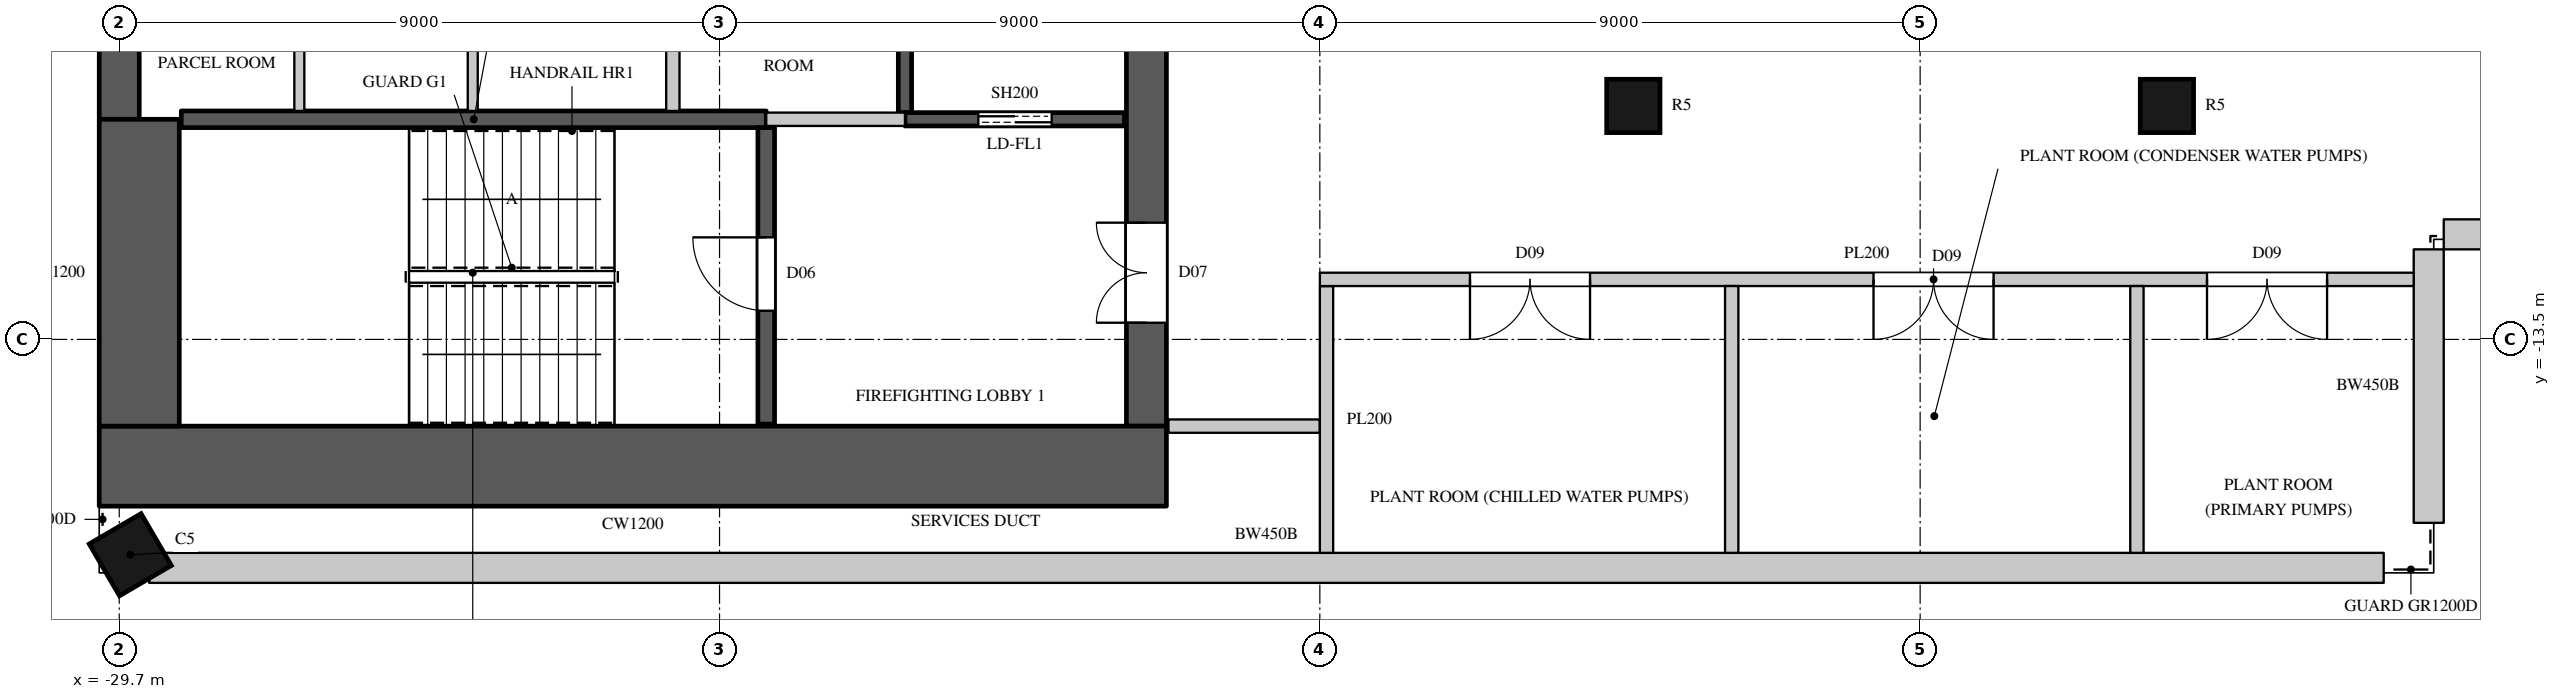
"""IFC4 building model, lengths in metres.
Left out: names, types, materials, properties, quantities, classifications, styles, units other than length and angle.
Written with IfcOpenShell. Run it as: python <this file> out.ifc"""

import sys

from ifc_helpers import new_model, si_unit, direction, frame, frame_2d, origin, origin_2d, place, context, subcontext, project, spatial, rectangle, circle, extrude, element, fill, save


model = new_model("IFC4")
c1 = context("Model", 3, precision=1e-05, world=origin(), true_north=direction((0.0, 1.0)))
c2 = subcontext(c1, "Body", "Model", "MODEL_VIEW")
j1 = project(units=[si_unit("LENGTHUNIT", "METRE"), si_unit("PLANEANGLEUNIT", "RADIAN")], contexts=[c1])
p1 = place(None, origin())
s1 = spatial("IfcSite", under=j1, at=p1, CompositionType="ELEMENT")
p2 = place(p1, origin())
s2 = spatial("IfcBuilding", under=s1, at=p2, CompositionType="ELEMENT")
p3 = place(p2, frame((0.0, 0.0, 335.0)))
s3 = spatial("IfcBuildingStorey", under=s2, at=p3, CompositionType="ELEMENT", Elevation=335.0)
p4 = place(p3, frame((-29.534, -16.728, 0.0), z_axis=(0.0, 0.0, 1.0), x_axis=(0.504399289829, -0.86347053014, 0.0)))
e1 = element("IfcColumn", 1, at=p4, inside=s3, PredefinedType="COLUMN", context=c2, shape_type="SweptSolid", body=[
    extrude(rectangle(XDim=0.9, YDim=0.9, at=origin_2d()), origin(), (0.0, 0.0, 1.0), 4.0),
])
for number, where, z_axis, x_axis in (
    (2, (-7.0, -10.0, 0.0), (0.0, 0.0, 1.0), (1.0, 0.0, 0.0)),
    (3, (1.0, -10.0, 0.0), (0.0, 0.0, 1.0), (1.0, 0.0, 0.0)),
):
    element("IfcColumn", number, at=place(p3, frame(where, z_axis=z_axis, x_axis=x_axis)), inside=s3, PredefinedType="COLUMN", context=c2, shape_type="SweptSolid", body=[
        extrude(circle(Radius=0.4, at=origin_2d()), origin(), (0.0, 0.0, 1.0), 4.0),
    ])
p5 = place(p3, frame((-29.25, -16.925, 0.0), z_axis=(0.0, 0.0, 1.0), x_axis=(1.0, 0.0, 0.0)))
e4 = element("IfcWall", 4, at=p5, inside=s3, PredefinedType="SOLIDWALL", context=c2, shape_type="SweptSolid", body=[
    extrude(rectangle(XDim=33.5, YDim=0.45, at=frame_2d((16.75, 0.0))), origin(), (0.0, 0.0, 1.0), 3.7),
])
for number, where, z_axis, x_axis in (
    (5, (4.925, -16.25, 0.0), (0.0, 0.0, 1.0), (0.0, 1.0, 0.0)),
    (6, (5.15, -11.925, 0.0), (0.0, 0.0, 1.0), (1.0, 0.0, 0.0)),
):
    element("IfcWall", number, at=place(p3, frame(where, z_axis=z_axis, x_axis=x_axis)), inside=s3, PredefinedType="SOLIDWALL", context=c2, shape_type="SweptSolid", body=[
        extrude(rectangle(XDim=4.1, YDim=0.45, at=frame_2d((2.05, 0.0))), origin(), (0.0, 0.0, 1.0), 3.7),
    ])
p6 = place(p3, frame((-30.0, -15.4, 0.0), z_axis=(0.0, 0.0, 1.0), x_axis=(1.0, 0.0, 0.0)))
e7 = element("IfcWall", 7, at=p6, inside=s3, PredefinedType="SHEAR", context=c2, shape_type="SweptSolid", body=[
    extrude(rectangle(XDim=16.0, YDim=1.2, at=frame_2d((8.0, 0.0))), origin(), (0.0, 0.0, 1.0), 4.0),
])
p7 = place(p3, frame((-14.3, -14.8, 0.0), z_axis=(0.0, 0.0, 1.0), x_axis=(0.0, 1.0, 0.0)))
e8 = element("IfcWall", 8, at=p7, inside=s3, PredefinedType="SHEAR", context=c2, shape_type="SweptSolid", body=[
    extrude(rectangle(XDim=29.6, YDim=0.6, at=frame_2d((14.8, 0.0))), origin(), (0.0, 0.0, 1.0), 4.0),
])
p8 = place(p7, frame((1.55, 0.0, 0.0)))
e9 = element("IfcOpeningElement", 9, at=p8, cuts=e8, PredefinedType="OPENING", context=c2, shape_type="SweptSolid", body=[
    extrude(rectangle(XDim=1.5, YDim=2.4, at=frame_2d((0.75, 1.2))), frame((0.0, 0.31, 0.0), z_axis=(0.0, -1.0, 0.0), x_axis=(1.0, 0.0, 0.0)), (0.0, 0.0, 1.0), 0.62),
])
p9 = place(p7, frame((26.55, 0.0, 0.0)))
e10 = element("IfcOpeningElement", 10, at=p9, cuts=e8, PredefinedType="OPENING", context=c2, shape_type="SweptSolid", body=[
    extrude(rectangle(XDim=1.5, YDim=2.4, at=frame_2d((0.75, 1.2))), frame((0.0, 0.31, 0.0), z_axis=(0.0, -1.0, 0.0), x_axis=(1.0, 0.0, 0.0)), (0.0, 0.0, 1.0), 0.62),
])
p10 = place(p7, frame((8.45, 0.0, 0.0)))
e11 = element("IfcOpeningElement", 11, at=p10, cuts=e8, PredefinedType="OPENING", context=c2, shape_type="SweptSolid", body=[
    extrude(rectangle(XDim=1.5, YDim=2.4, at=frame_2d((0.75, 1.2))), frame((0.0, 0.31, 0.0), z_axis=(0.0, -1.0, 0.0), x_axis=(1.0, 0.0, 0.0)), (0.0, 0.0, 1.0), 0.62),
])
p11 = place(p7, frame((19.65, 0.0, 0.0)))
e12 = element("IfcOpeningElement", 12, at=p11, cuts=e8, PredefinedType="OPENING", context=c2, shape_type="SweptSolid", body=[
    extrude(rectangle(XDim=1.5, YDim=2.4, at=frame_2d((0.75, 1.2))), frame((0.0, 0.31, 0.0), z_axis=(0.0, -1.0, 0.0), x_axis=(1.0, 0.0, 0.0)), (0.0, 0.0, 1.0), 0.62),
])
p12 = place(p7, frame((14.5, 0.0, 0.0)))
e13 = element("IfcOpeningElement", 13, at=p12, cuts=e8, PredefinedType="OPENING", context=c2, shape_type="SweptSolid", body=[
    extrude(rectangle(XDim=0.6, YDim=2.0, at=frame_2d((0.3, 1.0))), frame((0.0, 0.31, 0.0), z_axis=(0.0, -1.0, 0.0), x_axis=(1.0, 0.0, 0.0)), (0.0, 0.0, 1.0), 0.62),
])
p13 = place(p3, frame((-29.7, -10.2, 0.0), z_axis=(0.0, 0.0, 1.0), x_axis=(0.0, 1.0, 0.0)))
e14 = element("IfcWall", 14, at=p13, inside=s3, PredefinedType="SHEAR", context=c2, shape_type="SweptSolid", body=[
    extrude(rectangle(XDim=20.4, YDim=0.6, at=frame_2d((10.2, 0.0))), origin(), (0.0, 0.0, 1.0), 4.0),
])
p14 = place(p3, frame((-29.4, -14.8, 0.0), z_axis=(0.0, 0.0, 1.0), x_axis=(0.0, 1.0, 0.0)))
e15 = element("IfcWall", 15, at=p14, inside=s3, PredefinedType="SHEAR", context=c2, shape_type="SweptSolid", body=[
    extrude(rectangle(XDim=4.6, YDim=1.2, at=frame_2d((2.3, 0.0))), origin(), (0.0, 0.0, 1.0), 4.0),
])
for number, where, z_axis, x_axis in (
    (16, (-27.0, -10.075, 0.0), (0.0, 0.0, 1.0), (0.0, 1.0, 0.0)),
    (17, (-24.4, -10.075, 0.0), (0.0, 0.0, 1.0), (0.0, 1.0, 0.0)),
):
    element("IfcWall", number, at=place(p3, frame(where, z_axis=z_axis, x_axis=x_axis)), inside=s3, PredefinedType="PARTITIONING", context=c2, shape_type="SweptSolid", body=[
        extrude(rectangle(XDim=2.575, YDim=0.15, at=frame_2d((1.288, 0.0))), origin(), (0.0, 0.0, 1.0), 3.598),
    ])
p15 = place(p3, frame((-21.4, -10.075, 0.0), z_axis=(0.0, 0.0, 1.0), x_axis=(0.0, 1.0, 0.0)))
e18 = element("IfcWall", 18, at=p15, inside=s3, PredefinedType="PARTITIONING", context=c2, shape_type="SweptSolid", body=[
    extrude(rectangle(XDim=2.575, YDim=0.2, at=frame_2d((1.288, 0.0))), origin(), (0.0, 0.0, 1.0), 3.598),
])
p16 = place(p3, frame((-20.0, -10.2, 0.0), z_axis=(0.0, 0.0, 1.0), x_axis=(1.0, 0.0, 0.0)))
e19 = element("IfcWall", 19, at=p16, inside=s3, PredefinedType="PARTITIONING", context=c2, shape_type="SweptSolid", body=[
    extrude(rectangle(XDim=2.08, YDim=0.2, at=frame_2d((1.04, 0.0))), origin(), (0.0, 0.0, 1.0), 3.598),
])
p17 = place(p3, frame((-13.97, -14.8, 0.0), z_axis=(0.0, 0.0, 1.0), x_axis=(1.0, 0.0, 0.0)))
e20 = element("IfcWall", 20, at=p17, inside=s3, PredefinedType="PARTITIONING", context=c2, shape_type="SweptSolid", body=[
    extrude(rectangle(XDim=2.27, YDim=0.2, at=frame_2d((1.135, 0.0))), origin(), (0.0, 0.0, 1.0), 3.598),
])
p18 = place(p3, frame((-11.6, -16.7, 0.0), z_axis=(0.0, 0.0, 1.0), x_axis=(0.0, 1.0, 0.0)))
e21 = element("IfcWall", 21, at=p18, inside=s3, PredefinedType="PARTITIONING", context=c2, shape_type="SweptSolid", body=[
    extrude(rectangle(XDim=3.999, YDim=0.2, at=frame_2d((2.0, 0.0))), origin(), (0.0, 0.0, 1.0), 3.598),
])
p19 = place(p3, frame((-11.699, -12.6, 0.0), z_axis=(0.0, 0.0, 1.0), x_axis=(1.0, 0.0, 0.0)))
e22 = element("IfcWall", 22, at=p19, inside=s3, PredefinedType="PARTITIONING", context=c2, shape_type="SweptSolid", body=[
    extrude(rectangle(XDim=16.399, YDim=0.2, at=frame_2d((8.199, 0.0))), origin(), (0.0, 0.0, 1.0), 3.598),
])
p20 = place(p19, frame((2.25, 0.0, 0.0)))
e23 = element("IfcOpeningElement", 23, at=p20, cuts=e22, PredefinedType="OPENING", context=c2, shape_type="SweptSolid", body=[
    extrude(rectangle(XDim=1.8, YDim=2.4, at=frame_2d((0.9, 1.2))), frame((0.0, 0.11, 0.0), z_axis=(0.0, -1.0, 0.0), x_axis=(1.0, 0.0, 0.0)), (0.0, 0.0, 1.0), 0.22),
])
p21 = place(p19, frame((8.3, 0.0, 0.0)))
e24 = element("IfcOpeningElement", 24, at=p21, cuts=e22, PredefinedType="OPENING", context=c2, shape_type="SweptSolid", body=[
    extrude(rectangle(XDim=1.8, YDim=2.4, at=frame_2d((0.9, 1.2))), frame((0.0, 0.11, 0.0), z_axis=(0.0, -1.0, 0.0), x_axis=(1.0, 0.0, 0.0)), (0.0, 0.0, 1.0), 0.22),
])
p22 = place(p19, frame((13.3, 0.0, 0.0)))
e25 = element("IfcOpeningElement", 25, at=p22, cuts=e22, PredefinedType="OPENING", context=c2, shape_type="SweptSolid", body=[
    extrude(rectangle(XDim=1.8, YDim=2.4, at=frame_2d((0.9, 1.2))), frame((0.0, 0.11, 0.0), z_axis=(0.0, -1.0, 0.0), x_axis=(1.0, 0.0, 0.0)), (0.0, 0.0, 1.0), 0.22),
])
for number, where, z_axis, x_axis in (
    (26, (-5.525, -16.7, 0.0), (0.0, 0.0, 1.0), (0.0, 1.0, 0.0)),
    (27, (0.55, -16.7, 0.0), (0.0, 0.0, 1.0), (0.0, 1.0, 0.0)),
):
    element("IfcWall", number, at=place(p3, frame(where, z_axis=z_axis, x_axis=x_axis)), inside=s3, PredefinedType="PARTITIONING", context=c2, shape_type="SweptSolid", body=[
        extrude(rectangle(XDim=4.0, YDim=0.2, at=frame_2d((2.0, 0.0))), origin(), (0.0, 0.0, 1.0), 3.598),
    ])
p23 = place(p3, frame((-17.92, -10.1, 0.0), z_axis=(0.0, 0.0, 1.0), x_axis=(0.0, 1.0, 0.0)))
e28 = element("IfcWall", 28, at=p23, inside=s3, PredefinedType="SHEAR", context=c2, shape_type="SweptSolid", body=[
    extrude(rectangle(XDim=2.6, YDim=0.2, at=frame_2d((1.3, 0.0))), origin(), (0.0, 0.0, 1.0), 3.598),
])
p24 = place(p3, frame((-17.92, -10.2, 0.0), z_axis=(0.0, 0.0, 1.0), x_axis=(1.0, 0.0, 0.0)))
e29 = element("IfcWall", 29, at=p24, inside=s3, PredefinedType="SHEAR", context=c2, shape_type="SweptSolid", body=[
    extrude(rectangle(XDim=3.29, YDim=0.2, at=frame_2d((1.645, 0.0))), origin(), (0.0, 0.0, 1.0), 3.598),
])
p25 = place(p24, frame((1.1, 0.0, 0.0)))
e30 = element("IfcOpeningElement", 30, at=p25, cuts=e29, PredefinedType="OPENING", context=c2, shape_type="SweptSolid", body=[
    extrude(rectangle(XDim=1.1, YDim=2.2, at=frame_2d((0.55, 1.1))), frame((0.0, 0.11, 0.0), z_axis=(0.0, -1.0, 0.0), x_axis=(1.0, 0.0, 0.0)), (0.0, 0.0, 1.0), 0.22),
])
p26 = place(p3, frame((-28.77, -10.2, 0.0), z_axis=(0.0, 0.0, 1.0), x_axis=(1.0, 0.0, 0.0)))
e31 = element("IfcWall", 31, at=p26, inside=s3, PredefinedType="SHEAR", context=c2, shape_type="SweptSolid", body=[
    extrude(rectangle(XDim=8.77, YDim=0.25, at=frame_2d((4.385, 0.0))), origin(), (0.0, 0.0, 1.0), 3.598),
])
p27 = place(p3, frame((-20.0, -14.77, 0.0), z_axis=(0.0, 0.0, 1.0), x_axis=(0.0, 1.0, 0.0)))
e32 = element("IfcWall", 32, at=p27, inside=s3, PredefinedType="SHEAR", context=c2, shape_type="SweptSolid", body=[
    extrude(rectangle(XDim=4.445, YDim=0.25, at=frame_2d((2.223, 0.0))), origin(), (0.0, 0.0, 1.0), 3.598),
])
p28 = place(p27, frame((1.7, 0.0, 0.0)))
e33 = element("IfcOpeningElement", 33, at=p28, cuts=e32, PredefinedType="OPENING", context=c2, shape_type="SweptSolid", body=[
    extrude(rectangle(XDim=1.1, YDim=2.2, at=frame_2d((0.55, 1.1))), frame((0.0, 0.135, 0.0), z_axis=(0.0, -1.0, 0.0), x_axis=(1.0, 0.0, 0.0)), (0.0, 0.0, 1.0), 0.27),
])
p29 = place(p28, origin())
e34 = element("IfcDoor", 34, at=p29, inside=s3, OperationType="SINGLE_SWING_RIGHT", PredefinedType="DOOR", context=c2, shape_type="SweptSolid", body=[
    extrude(rectangle(XDim=1.1, YDim=2.2, at=frame_2d((0.55, 1.1))), frame((0.0, 0.025, 0.0), z_axis=(0.0, -1.0, 0.0), x_axis=(1.0, 0.0, 0.0)), (0.0, 0.0, 1.0), 0.05),
])
fill(e33, e34)
p30 = place(p25, origin())
e35 = element("IfcDoor", 35, at=p30, inside=s3, OperationType="DOUBLE_DOOR_SLIDING", PredefinedType="DOOR", context=c2, shape_type="SweptSolid", body=[
    extrude(rectangle(XDim=1.1, YDim=2.2, at=frame_2d((0.55, 1.1))), frame((0.0, 0.025, 0.0), z_axis=(0.0, -1.0, 0.0), x_axis=(1.0, 0.0, 0.0)), (0.0, 0.0, 1.0), 0.05),
])
fill(e30, e35)
p31 = place(p20, origin())
e36 = element("IfcDoor", 36, at=p31, inside=s3, OperationType="DOUBLE_DOOR_SINGLE_SWING", PredefinedType="DOOR", context=c2, shape_type="SweptSolid", body=[
    extrude(rectangle(XDim=1.8, YDim=2.4, at=frame_2d((0.9, 1.2))), frame((0.0, 0.025, 0.0), z_axis=(0.0, -1.0, 0.0), x_axis=(1.0, 0.0, 0.0)), (0.0, 0.0, 1.0), 0.05),
])
fill(e23, e36)
p32 = place(p21, origin())
e37 = element("IfcDoor", 37, at=p32, inside=s3, OperationType="DOUBLE_DOOR_SINGLE_SWING", PredefinedType="DOOR", context=c2, shape_type="SweptSolid", body=[
    extrude(rectangle(XDim=1.8, YDim=2.4, at=frame_2d((0.9, 1.2))), frame((0.0, 0.025, 0.0), z_axis=(0.0, -1.0, 0.0), x_axis=(1.0, 0.0, 0.0)), (0.0, 0.0, 1.0), 0.05),
])
fill(e24, e37)
p33 = place(p22, origin())
e38 = element("IfcDoor", 38, at=p33, inside=s3, OperationType="DOUBLE_DOOR_SINGLE_SWING", PredefinedType="DOOR", context=c2, shape_type="SweptSolid", body=[
    extrude(rectangle(XDim=1.8, YDim=2.4, at=frame_2d((0.9, 1.2))), frame((0.0, 0.025, 0.0), z_axis=(0.0, -1.0, 0.0), x_axis=(1.0, 0.0, 0.0)), (0.0, 0.0, 1.0), 0.05),
])
fill(e25, e38)
p34 = place(p8, origin())
e39 = element("IfcDoor", 39, at=p34, inside=s3, OperationType="DOUBLE_DOOR_SINGLE_SWING", PredefinedType="DOOR", context=c2, shape_type="SweptSolid", body=[
    extrude(rectangle(XDim=1.5, YDim=2.4, at=frame_2d((0.75, 1.2))), frame((0.0, 0.295, 0.0), z_axis=(0.0, -1.0, 0.0), x_axis=(1.0, 0.0, 0.0)), (0.0, 0.0, 1.0), 0.05),
])
fill(e9, e39)
save(model, sys.argv[1])
